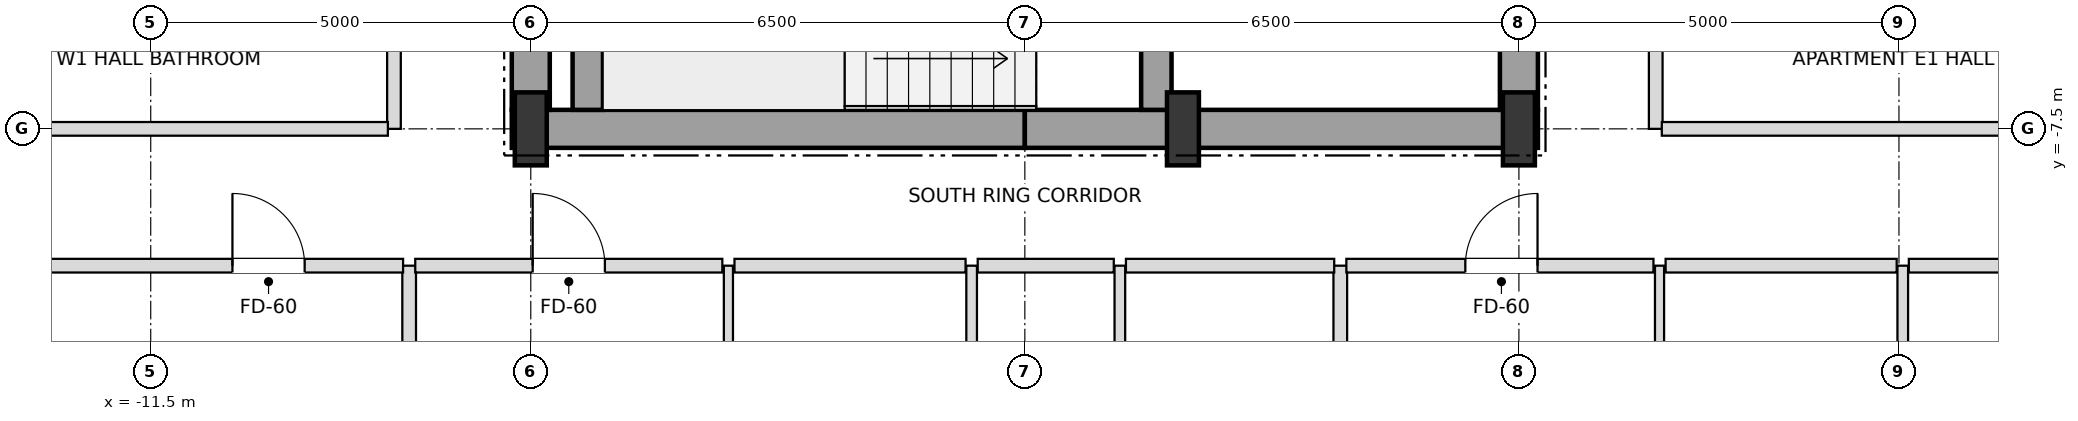
"""IFC4 building model, lengths in metres.
Left out: names, types, materials, properties, quantities, classifications, styles, units other than length and angle.
Written with IfcOpenShell. Run it as: python <this file> out.ifc"""

import sys

from ifc_helpers import new_model, si_unit, direction, frame, frame_2d, origin, origin_2d, place, context, subcontext, project, spatial, rectangle, i_section, extrude, element, fill, save


model = new_model("IFC4")
c1 = context("Model", 3, precision=1e-05, world=origin(), true_north=direction((0.0, 1.0)))
c2 = subcontext(c1, "Body", "Model", "MODEL_VIEW")
j1 = project(units=[si_unit("LENGTHUNIT", "METRE"), si_unit("PLANEANGLEUNIT", "RADIAN")], contexts=[c1])
p1 = place(None, origin())
s1 = spatial("IfcSite", under=j1, at=p1, CompositionType="ELEMENT")
p2 = place(p1, origin())
s2 = spatial("IfcBuilding", under=s1, at=p2, CompositionType="ELEMENT")
p3 = place(p2, frame((0.0, 0.0, 32.4)))
s3 = spatial("IfcBuildingStorey", under=s2, at=p3, CompositionType="ELEMENT", Elevation=32.4)
for number, where, z_axis, x_axis in (
    (1, (-6.5, -7.5, 0.0), (0.0, 0.0, 1.0), (1.0, 0.0, 0.0)),
    (2, (2.08, -7.5, 0.0), (0.0, 0.0, 1.0), (1.0, 0.0, 0.0)),
    (3, (6.5, -7.5, 0.0), (0.0, 0.0, 1.0), (1.0, 0.0, 0.0)),
):
    element("IfcColumn", number, at=place(p3, frame(where, z_axis=z_axis, x_axis=x_axis)), inside=s3, PredefinedType="COLUMN", context=c2, shape_type="SweptSolid", body=[
        extrude(i_section(OverallWidth=0.42, OverallDepth=0.96, WebThickness=0.022, FlangeThickness=0.034, at=origin_2d()), origin(), (0.0, 0.0, 1.0), 3.6),
    ])
for number, where, z_axis, x_axis in (
    (4, (-6.75, -7.5, 0.0), (0.0, 0.0, 1.0), (1.0, 0.0, 0.0)),
    (5, (0.0, -7.5, 0.0), (0.0, 0.0, 1.0), (1.0, 0.0, 0.0)),
):
    element("IfcWall", number, at=place(p3, frame(where, z_axis=z_axis, x_axis=x_axis)), inside=s3, PredefinedType="SHEAR", context=c2, shape_type="SweptSolid", body=[
        extrude(rectangle(XDim=6.75, YDim=0.5, at=frame_2d((3.375, 0.0))), origin(), (0.0, 0.0, 1.0), 3.38),
    ])
p4 = place(p3, frame((-6.5, -7.25, 0.0), z_axis=(0.0, 0.0, 1.0), x_axis=(0.0, 1.0, 0.0)))
e6 = element("IfcWall", 6, at=p4, inside=s3, PredefinedType="SHEAR", context=c2, shape_type="SweptSolid", body=[
    extrude(rectangle(XDim=3.55, YDim=0.5, at=frame_2d((1.775, 0.0))), origin(), (0.0, 0.0, 1.0), 3.38),
])
p5 = place(p3, frame((6.5, -7.25, 0.0), z_axis=(0.0, 0.0, 1.0), x_axis=(0.0, 1.0, 0.0)))
e7 = element("IfcWall", 7, at=p5, inside=s3, PredefinedType="SHEAR", context=c2, shape_type="SweptSolid", body=[
    extrude(rectangle(XDim=5.75, YDim=0.5, at=frame_2d((2.875, 0.0))), origin(), (0.0, 0.0, 1.0), 3.38),
])
p6 = place(p5, frame((0.85, 0.0, 0.0)))
e8 = element("IfcOpeningElement", 8, at=p6, cuts=e7, PredefinedType="OPENING", context=c2, shape_type="SweptSolid", body=[
    extrude(rectangle(XDim=1.05, YDim=2.15, at=frame_2d((0.525, 1.075))), frame((0.0, 0.26, 0.0), z_axis=(0.0, -1.0, 0.0), x_axis=(1.0, 0.0, 0.0)), (0.0, 0.0, 1.0), 0.52),
])
p7 = place(p3, frame((-5.75, -7.25, 0.0), z_axis=(0.0, 0.0, 1.0), x_axis=(0.0, 1.0, 0.0)))
e9 = element("IfcWall", 9, at=p7, inside=s3, PredefinedType="SHEAR", context=c2, shape_type="SweptSolid", body=[
    extrude(rectangle(XDim=2.9, YDim=0.4, at=frame_2d((1.45, 0.0))), origin(), (0.0, 0.0, 1.0), 3.38),
])
p8 = place(p3, frame((1.73, -7.25, 0.0), z_axis=(0.0, 0.0, 1.0), x_axis=(0.0, 1.0, 0.0)))
e10 = element("IfcWall", 10, at=p8, inside=s3, PredefinedType="SHEAR", context=c2, shape_type="SweptSolid", body=[
    extrude(rectangle(XDim=3.3, YDim=0.4, at=frame_2d((1.65, 0.0))), origin(), (0.0, 0.0, 1.0), 3.38),
])
p9 = place(p8, frame((0.9, 0.0, 0.0)))
e11 = element("IfcOpeningElement", 11, at=p9, cuts=e10, PredefinedType="OPENING", context=c2, shape_type="SweptSolid", body=[
    extrude(rectangle(XDim=1.05, YDim=2.15, at=frame_2d((0.525, 1.075))), frame((0.0, 0.21, 0.0), z_axis=(0.0, -1.0, 0.0), x_axis=(1.0, 0.0, 0.0)), (0.0, 0.0, 1.0), 0.42),
])
p10 = place(p3, frame((-8.3, -7.5, 0.0), z_axis=(0.0, 0.0, 1.0), x_axis=(0.0, 1.0, 0.0)))
e12 = element("IfcWall", 12, at=p10, inside=s3, PredefinedType="PARTITIONING", context=c2, shape_type="SweptSolid", body=[
    extrude(rectangle(XDim=15.0, YDim=0.18, at=frame_2d((7.5, 0.0))), origin(), (0.0, 0.0, 1.0), 3.38),
])
p11 = place(p10, frame((2.965, 0.0, 0.0)))
e13 = element("IfcOpeningElement", 13, at=p11, cuts=e12, PredefinedType="OPENING", context=c2, shape_type="SweptSolid", body=[
    extrude(rectangle(XDim=0.95, YDim=2.15, at=frame_2d((0.475, 1.075))), frame((0.0, 0.1, 0.0), z_axis=(0.0, -1.0, 0.0), x_axis=(1.0, 0.0, 0.0)), (0.0, 0.0, 1.0), 0.2),
])
p12 = place(p10, frame((10.465, 0.0, 0.0)))
e14 = element("IfcOpeningElement", 14, at=p12, cuts=e12, PredefinedType="OPENING", context=c2, shape_type="SweptSolid", body=[
    extrude(rectangle(XDim=0.95, YDim=2.15, at=frame_2d((0.475, 1.075))), frame((0.0, 0.1, 0.0), z_axis=(0.0, -1.0, 0.0), x_axis=(1.0, 0.0, 0.0)), (0.0, 0.0, 1.0), 0.2),
])
p13 = place(p3, frame((-8.1, -24.9, 0.0), z_axis=(0.0, 0.0, 1.0), x_axis=(0.0, 1.0, 0.0)))
e15 = element("IfcWall", 15, at=p13, inside=s3, PredefinedType="PARTITIONING", context=c2, shape_type="SweptSolid", body=[
    extrude(rectangle(XDim=15.6, YDim=0.18, at=frame_2d((7.8, 0.0))), origin(), (0.0, 0.0, 1.0), 2.816),
])
p14 = place(p3, frame((-3.9, -24.9, 0.0), z_axis=(0.0, 0.0, 1.0), x_axis=(0.0, 1.0, 0.0)))
e16 = element("IfcWall", 16, at=p14, inside=s3, PredefinedType="PARTITIONING", context=c2, shape_type="SweptSolid", body=[
    extrude(rectangle(XDim=15.6, YDim=0.12, at=frame_2d((7.8, 0.0))), origin(), (0.0, 0.0, 1.0), 2.816),
])
p15 = place(p14, frame((10.325, 0.0, 0.0)))
e17 = element("IfcOpeningElement", 17, at=p15, cuts=e16, PredefinedType="OPENING", context=c2, shape_type="SweptSolid", body=[
    extrude(rectangle(XDim=0.95, YDim=2.1, at=frame_2d((0.475, 1.05))), frame((0.0, 0.07, 0.0), z_axis=(0.0, -1.0, 0.0), x_axis=(1.0, 0.0, 0.0)), (0.0, 0.0, 1.0), 0.14),
])
p16 = place(p14, frame((2.55, 0.0, 0.0)))
e18 = element("IfcOpeningElement", 18, at=p16, cuts=e16, PredefinedType="OPENING", context=c2, shape_type="SweptSolid", body=[
    extrude(rectangle(XDim=0.9, YDim=2.1, at=frame_2d((0.45, 1.05))), frame((0.0, 0.07, 0.0), z_axis=(0.0, -1.0, 0.0), x_axis=(1.0, 0.0, 0.0)), (0.0, 0.0, 1.0), 0.14),
])
p17 = place(p3, frame((-0.7, -24.9, 0.0), z_axis=(0.0, 0.0, 1.0), x_axis=(0.0, 1.0, 0.0)))
e19 = element("IfcWall", 19, at=p17, inside=s3, PredefinedType="PARTITIONING", context=c2, shape_type="SweptSolid", body=[
    extrude(rectangle(XDim=15.6, YDim=0.14, at=frame_2d((7.8, 0.0))), origin(), (0.0, 0.0, 1.0), 2.816),
])
p18 = place(p17, frame((10.35, 0.0, 0.0)))
e20 = element("IfcOpeningElement", 20, at=p18, cuts=e19, PredefinedType="OPENING", context=c2, shape_type="SweptSolid", body=[
    extrude(rectangle(XDim=0.9, YDim=2.1, at=frame_2d((0.45, 1.05))), frame((0.0, 0.08, 0.0), z_axis=(0.0, -1.0, 0.0), x_axis=(1.0, 0.0, 0.0)), (0.0, 0.0, 1.0), 0.16),
])
p19 = place(p17, frame((2.55, 0.0, 0.0)))
e21 = element("IfcOpeningElement", 21, at=p19, cuts=e19, PredefinedType="OPENING", context=c2, shape_type="SweptSolid", body=[
    extrude(rectangle(XDim=0.9, YDim=2.1, at=frame_2d((0.45, 1.05))), frame((0.0, 0.08, 0.0), z_axis=(0.0, -1.0, 0.0), x_axis=(1.0, 0.0, 0.0)), (0.0, 0.0, 1.0), 0.16),
])
p20 = place(p3, frame((1.25, -18.9, 0.0), z_axis=(0.0, 0.0, 1.0), x_axis=(0.0, 1.0, 0.0)))
e22 = element("IfcWall", 22, at=p20, inside=s3, PredefinedType="PARTITIONING", context=c2, shape_type="SweptSolid", body=[
    extrude(rectangle(XDim=9.6, YDim=0.14, at=frame_2d((4.8, 0.0))), origin(), (0.0, 0.0, 1.0), 2.948),
])
p21 = place(p3, frame((4.15, -24.9, 0.0), z_axis=(0.0, 0.0, 1.0), x_axis=(0.0, 1.0, 0.0)))
e23 = element("IfcWall", 23, at=p21, inside=s3, PredefinedType="PARTITIONING", context=c2, shape_type="SweptSolid", body=[
    extrude(rectangle(XDim=15.6, YDim=0.18, at=frame_2d((7.8, 0.0))), origin(), (0.0, 0.0, 1.0), 2.816),
])
p22 = place(p3, frame((8.3, -7.5, 0.0), z_axis=(0.0, 0.0, 1.0), x_axis=(0.0, 1.0, 0.0)))
e24 = element("IfcWall", 24, at=p22, inside=s3, PredefinedType="PARTITIONING", context=c2, shape_type="SweptSolid", body=[
    extrude(rectangle(XDim=15.0, YDim=0.18, at=frame_2d((7.5, 0.0))), origin(), (0.0, 0.0, 1.0), 3.38),
])
p23 = place(p22, frame((2.995, 0.0, 0.0)))
e25 = element("IfcOpeningElement", 25, at=p23, cuts=e24, PredefinedType="OPENING", context=c2, shape_type="SweptSolid", body=[
    extrude(rectangle(XDim=0.95, YDim=2.15, at=frame_2d((0.475, 1.075))), frame((0.0, 0.1, 0.0), z_axis=(0.0, -1.0, 0.0), x_axis=(1.0, 0.0, 0.0)), (0.0, 0.0, 1.0), 0.2),
])
p24 = place(p22, frame((10.495, 0.0, 0.0)))
e26 = element("IfcOpeningElement", 26, at=p24, cuts=e24, PredefinedType="OPENING", context=c2, shape_type="SweptSolid", body=[
    extrude(rectangle(XDim=0.95, YDim=2.15, at=frame_2d((0.475, 1.075))), frame((0.0, 0.1, 0.0), z_axis=(0.0, -1.0, 0.0), x_axis=(1.0, 0.0, 0.0)), (0.0, 0.0, 1.0), 0.2),
])
p25 = place(p3, frame((8.35, -18.9, 0.0), z_axis=(0.0, 0.0, 1.0), x_axis=(0.0, 1.0, 0.0)))
e27 = element("IfcWall", 27, at=p25, inside=s3, PredefinedType="PARTITIONING", context=c2, shape_type="SweptSolid", body=[
    extrude(rectangle(XDim=9.6, YDim=0.12, at=frame_2d((4.8, 0.0))), origin(), (0.0, 0.0, 1.0), 2.816),
])
p26 = place(p25, frame((4.325, 0.0, 0.0)))
e28 = element("IfcOpeningElement", 28, at=p26, cuts=e27, PredefinedType="OPENING", context=c2, shape_type="SweptSolid", body=[
    extrude(rectangle(XDim=0.95, YDim=2.1, at=frame_2d((0.475, 1.05))), frame((0.0, 0.07, 0.0), z_axis=(0.0, -1.0, 0.0), x_axis=(1.0, 0.0, 0.0)), (0.0, 0.0, 1.0), 0.14),
])
p27 = place(p3, frame((11.55, -18.9, 0.0), z_axis=(0.0, 0.0, 1.0), x_axis=(0.0, 1.0, 0.0)))
e29 = element("IfcWall", 29, at=p27, inside=s3, PredefinedType="PARTITIONING", context=c2, shape_type="SweptSolid", body=[
    extrude(rectangle(XDim=9.6, YDim=0.14, at=frame_2d((4.8, 0.0))), origin(), (0.0, 0.0, 1.0), 2.736),
])
p28 = place(p27, frame((4.35, 0.0, 0.0)))
e30 = element("IfcOpeningElement", 30, at=p28, cuts=e29, PredefinedType="OPENING", context=c2, shape_type="SweptSolid", body=[
    extrude(rectangle(XDim=0.9, YDim=2.1, at=frame_2d((0.45, 1.05))), frame((0.0, 0.08, 0.0), z_axis=(0.0, -1.0, 0.0), x_axis=(1.0, 0.0, 0.0)), (0.0, 0.0, 1.0), 0.16),
])
p29 = place(p3, frame((-13.67, -9.3, 0.0), z_axis=(0.0, 0.0, 1.0), x_axis=(1.0, 0.0, 0.0)))
e31 = element("IfcWall", 31, at=p29, inside=s3, PredefinedType="PARTITIONING", context=c2, shape_type="SweptSolid", body=[
    extrude(rectangle(XDim=5.49, YDim=0.18, at=frame_2d((2.745, 0.0))), origin(), (0.0, 0.0, 1.0), 3.38),
])
p30 = place(p29, frame((3.245, 0.0, 0.0)))
e32 = element("IfcOpeningElement", 32, at=p30, cuts=e31, PredefinedType="OPENING", context=c2, shape_type="SweptSolid", body=[
    extrude(rectangle(XDim=0.95, YDim=2.15, at=frame_2d((0.475, 1.075))), frame((0.0, 0.1, 0.0), z_axis=(0.0, -1.0, 0.0), x_axis=(1.0, 0.0, 0.0)), (0.0, 0.0, 1.0), 0.2),
])
p31 = place(p3, frame((-8.02, -9.3, 0.0), z_axis=(0.0, 0.0, 1.0), x_axis=(1.0, 0.0, 0.0)))
e33 = element("IfcWall", 33, at=p31, inside=s3, PredefinedType="PARTITIONING", context=c2, shape_type="SweptSolid", body=[
    extrude(rectangle(XDim=4.04, YDim=0.18, at=frame_2d((2.02, 0.0))), origin(), (0.0, 0.0, 1.0), 2.816),
])
p32 = place(p31, frame((1.545, 0.0, 0.0)))
e34 = element("IfcOpeningElement", 34, at=p32, cuts=e33, PredefinedType="OPENING", context=c2, shape_type="SweptSolid", body=[
    extrude(rectangle(XDim=0.95, YDim=2.15, at=frame_2d((0.475, 1.075))), frame((0.0, 0.1, 0.0), z_axis=(0.0, -1.0, 0.0), x_axis=(1.0, 0.0, 0.0)), (0.0, 0.0, 1.0), 0.2),
])
p33 = place(p3, frame((-3.82, -9.3, 0.0), z_axis=(0.0, 0.0, 1.0), x_axis=(1.0, 0.0, 0.0)))
e35 = element("IfcWall", 35, at=p33, inside=s3, PredefinedType="PARTITIONING", context=c2, shape_type="SweptSolid", body=[
    extrude(rectangle(XDim=3.04, YDim=0.18, at=frame_2d((1.52, 0.0))), origin(), (0.0, 0.0, 1.0), 3.38),
])
p34 = place(p3, frame((-0.62, -9.3, 0.0), z_axis=(0.0, 0.0, 1.0), x_axis=(1.0, 0.0, 0.0)))
e36 = element("IfcWall", 36, at=p34, inside=s3, PredefinedType="PARTITIONING", context=c2, shape_type="SweptSolid", body=[
    extrude(rectangle(XDim=1.79, YDim=0.18, at=frame_2d((0.895, 0.0))), origin(), (0.0, 0.0, 1.0), 3.38),
])
p35 = place(p3, frame((1.33, -9.3, 0.0), z_axis=(0.0, 0.0, 1.0), x_axis=(1.0, 0.0, 0.0)))
e37 = element("IfcWall", 37, at=p35, inside=s3, PredefinedType="PARTITIONING", context=c2, shape_type="SweptSolid", body=[
    extrude(rectangle(XDim=2.74, YDim=0.18, at=frame_2d((1.37, 0.0))), origin(), (0.0, 0.0, 1.0), 3.38),
])
p36 = place(p3, frame((4.23, -9.3, 0.0), z_axis=(0.0, 0.0, 1.0), x_axis=(1.0, 0.0, 0.0)))
e38 = element("IfcWall", 38, at=p36, inside=s3, PredefinedType="PARTITIONING", context=c2, shape_type="SweptSolid", body=[
    extrude(rectangle(XDim=4.04, YDim=0.18, at=frame_2d((2.02, 0.0))), origin(), (0.0, 0.0, 1.0), 2.816),
])
p37 = place(p36, frame((1.565, 0.0, 0.0)))
e39 = element("IfcOpeningElement", 39, at=p37, cuts=e38, PredefinedType="OPENING", context=c2, shape_type="SweptSolid", body=[
    extrude(rectangle(XDim=0.95, YDim=2.15, at=frame_2d((0.475, 1.075))), frame((0.0, 0.1, 0.0), z_axis=(0.0, -1.0, 0.0), x_axis=(1.0, 0.0, 0.0)), (0.0, 0.0, 1.0), 0.2),
])
p38 = place(p3, frame((8.43, -9.3, 0.0), z_axis=(0.0, 0.0, 1.0), x_axis=(1.0, 0.0, 0.0)))
e40 = element("IfcWall", 40, at=p38, inside=s3, PredefinedType="PARTITIONING", context=c2, shape_type="SweptSolid", body=[
    extrude(rectangle(XDim=3.04, YDim=0.18, at=frame_2d((1.52, 0.0))), origin(), (0.0, 0.0, 1.0), 3.38),
])
p39 = place(p3, frame((11.63, -9.3, 0.0), z_axis=(0.0, 0.0, 1.0), x_axis=(1.0, 0.0, 0.0)))
e41 = element("IfcWall", 41, at=p39, inside=s3, PredefinedType="PARTITIONING", context=c2, shape_type="SweptSolid", body=[
    extrude(rectangle(XDim=1.79, YDim=0.18, at=frame_2d((0.895, 0.0))), origin(), (0.0, 0.0, 1.0), 3.38),
])
for number, where, z_axis, x_axis in (
    (42, (-16.02, -7.5, 0.0), (0.0, 0.0, 1.0), (1.0, 0.0, 0.0)),
    (43, (8.38, -7.5, 0.0), (0.0, 0.0, 1.0), (1.0, 0.0, 0.0)),
):
    element("IfcWall", number, at=place(p3, frame(where, z_axis=z_axis, x_axis=x_axis)), inside=s3, PredefinedType="PARTITIONING", context=c2, shape_type="SweptSolid", body=[
        extrude(rectangle(XDim=7.64, YDim=0.18, at=frame_2d((3.82, 0.0))), origin(), (0.0, 0.0, 1.0), 2.816),
    ])
p40 = place(p30, origin())
e44 = element("IfcDoor", 44, at=p40, inside=s3, OperationType="SINGLE_SWING_LEFT", PredefinedType="DOOR", context=c2, shape_type="SweptSolid", body=[
    extrude(rectangle(XDim=0.95, YDim=2.15, at=frame_2d((0.475, 1.075))), frame((0.0, 0.025, 0.0), z_axis=(0.0, -1.0, 0.0), x_axis=(1.0, 0.0, 0.0)), (0.0, 0.0, 1.0), 0.05),
])
fill(e32, e44)
p41 = place(p32, origin())
e45 = element("IfcDoor", 45, at=p41, inside=s3, OperationType="SINGLE_SWING_LEFT", PredefinedType="DOOR", context=c2, shape_type="SweptSolid", body=[
    extrude(rectangle(XDim=0.95, YDim=2.15, at=frame_2d((0.475, 1.075))), frame((0.0, 0.025, 0.0), z_axis=(0.0, -1.0, 0.0), x_axis=(1.0, 0.0, 0.0)), (0.0, 0.0, 1.0), 0.05),
])
fill(e34, e45)
p42 = place(p37, origin())
e46 = element("IfcDoor", 46, at=p42, inside=s3, OperationType="SINGLE_SWING_RIGHT", PredefinedType="DOOR", context=c2, shape_type="SweptSolid", body=[
    extrude(rectangle(XDim=0.95, YDim=2.15, at=frame_2d((0.475, 1.075))), frame((0.0, 0.025, 0.0), z_axis=(0.0, -1.0, 0.0), x_axis=(1.0, 0.0, 0.0)), (0.0, 0.0, 1.0), 0.05),
])
fill(e39, e46)
save(model, sys.argv[1])
